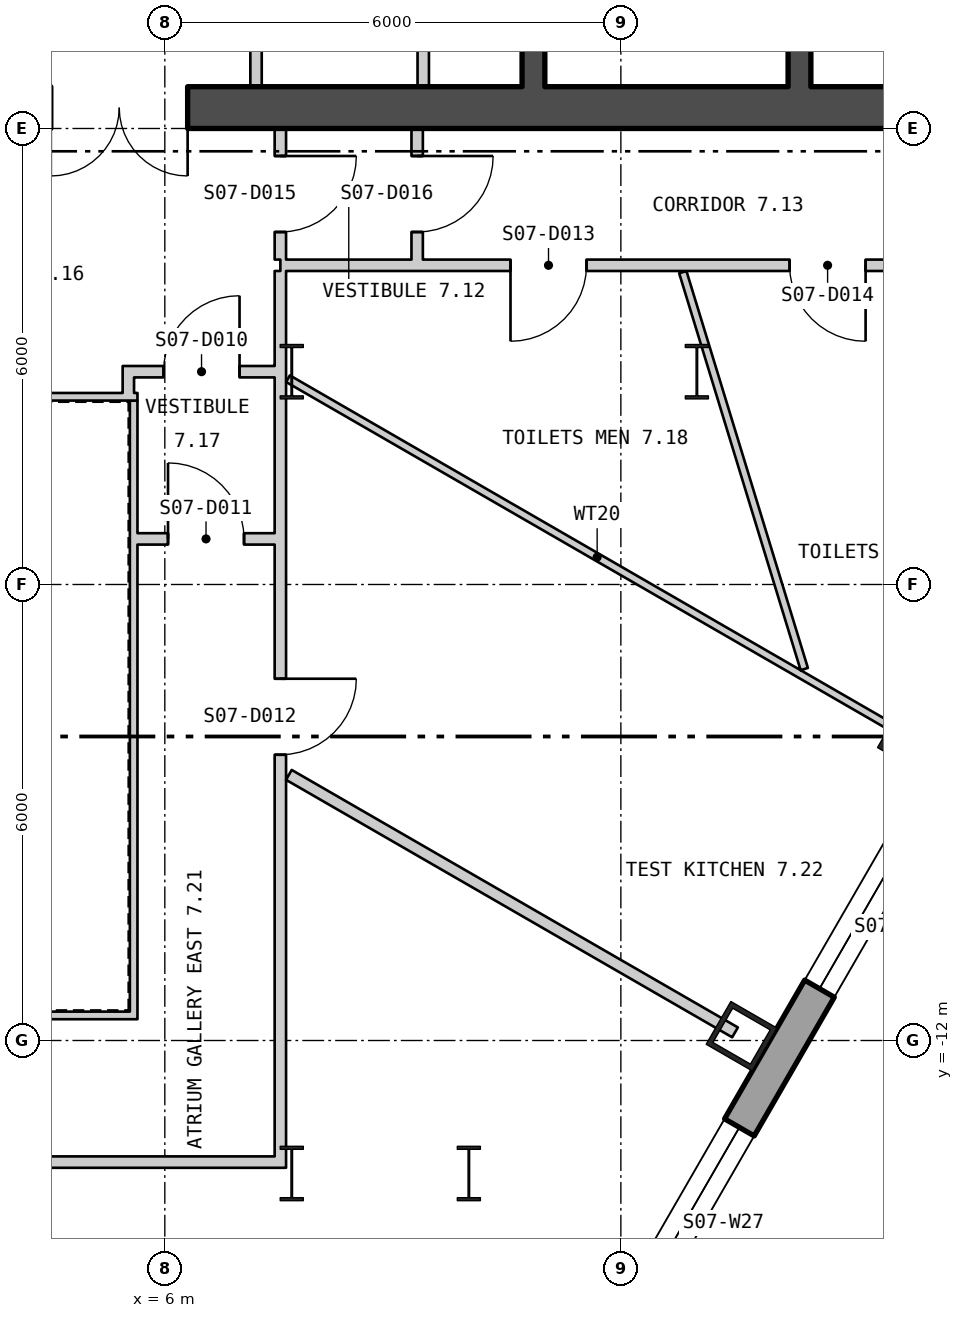
"""IFC4 building model, lengths in metres.
Left out: names, types, materials, properties, quantities, classifications, styles, units other than length and angle.
Written with IfcOpenShell. Run it as: python <this file> out.ifc"""

import sys

from ifc_helpers import new_model, si_unit, direction, frame, frame_2d, origin, origin_2d, place, context, subcontext, project, spatial, polyline, rectangle, hollow_rectangle, i_section, outline, extrude, element, fill, save


model = new_model("IFC4")
c1 = context("Model", 3, precision=1e-05, world=origin(), true_north=direction((0.0, 1.0)))
c2 = subcontext(c1, "Body", "Model", "MODEL_VIEW")
j1 = project(units=[si_unit("LENGTHUNIT", "METRE"), si_unit("PLANEANGLEUNIT", "RADIAN")], contexts=[c1])
p1 = place(None, origin())
s1 = spatial("IfcSite", under=j1, at=p1, CompositionType="ELEMENT")
p2 = place(p1, origin())
s2 = spatial("IfcBuilding", under=s1, at=p2, CompositionType="ELEMENT")
p3 = place(p2, frame((0.0, 0.0, 97.8)))
s3 = spatial("IfcBuildingStorey", under=s2, at=p3, CompositionType="ELEMENT", Elevation=97.8)
for number, where, z_axis, x_axis in (
    (1, (13.588, -11.943, 0.0), (0.0, 0.0, 1.0), (0.5, 0.866, 0.0)),
    (2, (15.842, -8.039, 0.0), (0.0, 0.0, 1.0), (0.5, 0.866, 0.0)),
):
    element("IfcColumn", number, at=place(p3, frame(where, z_axis=z_axis, x_axis=x_axis)), inside=s3, PredefinedType="COLUMN", context=c2, shape_type="SweptSolid", body=[
        extrude(hollow_rectangle(XDim=0.65, YDim=0.7, WallThickness=0.065, at=origin_2d()), origin(), (0.0, 0.0, 1.0), 4.5),
    ])
for number, where, z_axis, x_axis in (
    (3, (7.67, -3.2, 0.0), (0.0, 0.0, 1.0), (1.0, 0.0, 0.0)),
    (4, (7.67, -13.75, 0.0), (0.0, 0.0, 1.0), (1.0, 0.0, 0.0)),
    (5, (13.0, -3.2, 0.0), (0.0, 0.0, 1.0), (1.0, 0.0, 0.0)),
    (6, (10.0, -13.75, 0.0), (0.0, 0.0, 1.0), (1.0, 0.0, 0.0)),
):
    element("IfcColumn", number, at=place(p3, frame(where, z_axis=z_axis, x_axis=x_axis)), inside=s3, PredefinedType="COLUMN", context=c2, shape_type="SweptSolid", body=[
        extrude(i_section(OverallWidth=0.304, OverallDepth=0.716, WebThickness=0.021, FlangeThickness=0.04, at=origin_2d()), origin(), (0.0, 0.0, 1.0), 4.5),
    ])
p4 = place(p3, frame((4.905, -28.133, -0.18), z_axis=(0.0, 0.0, 1.0), x_axis=(0.500000711659, 0.866024992908, 0.0)))
e7 = element("IfcWall", 7, at=p4, inside=s3, PredefinedType="SOLIDWALL", context=c2, shape_type="SweptSolid", body=[
    extrude(outline(polyline([(-0.13, -0.225), (45.87, -0.225), (45.61, 0.225), (0.13, 0.225), (-0.13, -0.225)])), origin(), (0.0, 0.0, 1.0), 4.28),
])
p5 = place(p4, frame((1.424, 0.0, 1.08)))
e8 = element("IfcOpeningElement", 8, at=p5, cuts=e7, PredefinedType="OPENING", context=c2, shape_type="SweptSolid", body=[
    extrude(rectangle(XDim=2.4, YDim=2.6, at=frame_2d((1.2, 1.3))), frame((0.0, 0.235, 0.0), z_axis=(0.0, -1.0, 0.0), x_axis=(1.0, 0.0, 0.0)), (0.0, 0.0, 1.0), 0.47),
])
p6 = place(p4, frame((5.893, 0.0, 1.08)))
e9 = element("IfcOpeningElement", 9, at=p6, cuts=e7, PredefinedType="OPENING", context=c2, shape_type="SweptSolid", body=[
    extrude(rectangle(XDim=2.4, YDim=2.6, at=frame_2d((1.2, 1.3))), frame((0.0, 0.235, 0.0), z_axis=(0.0, -1.0, 0.0), x_axis=(1.0, 0.0, 0.0)), (0.0, 0.0, 1.0), 0.47),
])
p7 = place(p4, frame((10.401, 0.0, 1.08)))
e10 = element("IfcOpeningElement", 10, at=p7, cuts=e7, PredefinedType="OPENING", context=c2, shape_type="SweptSolid", body=[
    extrude(rectangle(XDim=2.4, YDim=2.6, at=frame_2d((1.2, 1.3))), frame((0.0, 0.235, 0.0), z_axis=(0.0, -1.0, 0.0), x_axis=(1.0, 0.0, 0.0)), (0.0, 0.0, 1.0), 0.47),
])
p8 = place(p4, frame((14.909, 0.0, 1.08)))
e11 = element("IfcOpeningElement", 11, at=p8, cuts=e7, PredefinedType="OPENING", context=c2, shape_type="SweptSolid", body=[
    extrude(rectangle(XDim=2.4, YDim=2.6, at=frame_2d((1.2, 1.3))), frame((0.0, 0.235, 0.0), z_axis=(0.0, -1.0, 0.0), x_axis=(1.0, 0.0, 0.0)), (0.0, 0.0, 1.0), 0.47),
])
p9 = place(p4, frame((19.416, 0.0, 1.08)))
e12 = element("IfcOpeningElement", 12, at=p9, cuts=e7, PredefinedType="OPENING", context=c2, shape_type="SweptSolid", body=[
    extrude(rectangle(XDim=2.4, YDim=2.6, at=frame_2d((1.2, 1.3))), frame((0.0, 0.235, 0.0), z_axis=(0.0, -1.0, 0.0), x_axis=(1.0, 0.0, 0.0)), (0.0, 0.0, 1.0), 0.47),
])
p10 = place(p4, frame((28.431, 0.0, 1.08)))
e13 = element("IfcOpeningElement", 13, at=p10, cuts=e7, PredefinedType="OPENING", context=c2, shape_type="SweptSolid", body=[
    extrude(rectangle(XDim=2.4, YDim=2.6, at=frame_2d((1.2, 1.3))), frame((0.0, 0.235, 0.0), z_axis=(0.0, -1.0, 0.0), x_axis=(1.0, 0.0, 0.0)), (0.0, 0.0, 1.0), 0.47),
])
p11 = place(p4, frame((32.939, 0.0, 1.08)))
e14 = element("IfcOpeningElement", 14, at=p11, cuts=e7, PredefinedType="OPENING", context=c2, shape_type="SweptSolid", body=[
    extrude(rectangle(XDim=2.4, YDim=2.6, at=frame_2d((1.2, 1.3))), frame((0.0, 0.235, 0.0), z_axis=(0.0, -1.0, 0.0), x_axis=(1.0, 0.0, 0.0)), (0.0, 0.0, 1.0), 0.47),
])
p12 = place(p4, frame((37.447, 0.0, 1.08)))
e15 = element("IfcOpeningElement", 15, at=p12, cuts=e7, PredefinedType="OPENING", context=c2, shape_type="SweptSolid", body=[
    extrude(rectangle(XDim=2.4, YDim=2.6, at=frame_2d((1.2, 1.3))), frame((0.0, 0.235, 0.0), z_axis=(0.0, -1.0, 0.0), x_axis=(1.0, 0.0, 0.0)), (0.0, 0.0, 1.0), 0.47),
])
p13 = place(p4, frame((41.916, 0.0, 1.08)))
e16 = element("IfcOpeningElement", 16, at=p13, cuts=e7, PredefinedType="OPENING", context=c2, shape_type="SweptSolid", body=[
    extrude(rectangle(XDim=2.4, YDim=2.6, at=frame_2d((1.2, 1.3))), frame((0.0, 0.235, 0.0), z_axis=(0.0, -1.0, 0.0), x_axis=(1.0, 0.0, 0.0)), (0.0, 0.0, 1.0), 0.47),
])
p14 = place(p3, frame((-5.64, -11.67, 0.0), z_axis=(0.0, 0.0, 1.0), x_axis=(1.0, 0.0, 0.0)))
e17 = element("IfcWall", 17, at=p14, inside=s3, PredefinedType="PARTITIONING", context=c2, shape_type="SweptSolid", body=[
    extrude(rectangle(XDim=11.28, YDim=0.1, at=frame_2d((5.64, 0.0))), origin(), (0.0, 0.0, 1.0), 4.3),
])
p15 = place(p3, frame((5.59, -11.62, 0.0), z_axis=(0.0, 0.0, 1.0), x_axis=(0.0, 1.0, 0.0)))
e18 = element("IfcWall", 18, at=p15, inside=s3, PredefinedType="PARTITIONING", context=c2, shape_type="SweptSolid", body=[
    extrude(rectangle(XDim=8.04, YDim=0.1, at=frame_2d((4.02, 0.0))), origin(), (0.0, 0.0, 1.0), 4.3),
])
p16 = place(p3, frame((5.64, -3.53, 0.0), z_axis=(0.0, 0.0, 1.0), x_axis=(-1.0, 0.0, 0.0)))
e19 = element("IfcWall", 19, at=p16, inside=s3, PredefinedType="PARTITIONING", context=c2, shape_type="SweptSolid", body=[
    extrude(rectangle(XDim=11.28, YDim=0.1, at=frame_2d((5.64, 0.0))), origin(), (0.0, 0.0, 1.0), 4.3),
])
p17 = place(p3, frame((-17.5, 0.275, 0.0), z_axis=(0.0, 0.0, 1.0), x_axis=(1.0, 0.0, 0.0)))
e20 = element("IfcWall", 20, at=p17, inside=s3, PredefinedType="SHEAR", context=c2, shape_type="SweptSolid", body=[
    extrude(rectangle(XDim=35.0, YDim=0.55, at=frame_2d((17.5, 0.0))), origin(), (0.0, 0.0, 1.0), 4.3),
])
p18 = place(p17, frame((12.0, 0.0, 0.0)))
e21 = element("IfcOpeningElement", 21, at=p18, cuts=e20, PredefinedType="OPENING", context=c2, shape_type="SweptSolid", body=[
    extrude(rectangle(XDim=1.8, YDim=2.4, at=frame_2d((0.9, 1.2))), frame((0.0, 0.285, 0.0), z_axis=(0.0, -1.0, 0.0), x_axis=(1.0, 0.0, 0.0)), (0.0, 0.0, 1.0), 0.57),
])
p19 = place(p17, frame((22.0, 0.0, 0.0)))
e22 = element("IfcOpeningElement", 22, at=p19, cuts=e20, PredefinedType="OPENING", context=c2, shape_type="SweptSolid", body=[
    extrude(rectangle(XDim=1.8, YDim=2.4, at=frame_2d((0.9, 1.2))), frame((0.0, 0.285, 0.0), z_axis=(0.0, -1.0, 0.0), x_axis=(1.0, 0.0, 0.0)), (0.0, 0.0, 1.0), 0.57),
])
p20 = place(p3, frame((10.85, 0.55, 0.0), z_axis=(0.0, 0.0, 1.0), x_axis=(0.0, 1.0, 0.0)))
e23 = element("IfcWall", 23, at=p20, inside=s3, PredefinedType="SHEAR", context=c2, shape_type="SweptSolid", body=[
    extrude(rectangle(XDim=16.9, YDim=0.3, at=frame_2d((8.45, 0.0))), origin(), (0.0, 0.0, 1.0), 4.3),
])
p21 = place(p20, frame((5.125, 0.0, 0.0)))
e24 = element("IfcOpeningElement", 24, at=p21, cuts=e23, PredefinedType="OPENING", context=c2, shape_type="SweptSolid", body=[
    extrude(rectangle(XDim=1.25, YDim=2.1, at=frame_2d((0.625, 1.05))), frame((0.0, 0.16, 0.0), z_axis=(0.0, -1.0, 0.0), x_axis=(1.0, 0.0, 0.0)), (0.0, 0.0, 1.0), 0.32),
])
p22 = place(p20, frame((1.55, 0.0, 0.0)))
e25 = element("IfcOpeningElement", 25, at=p22, cuts=e23, PredefinedType="OPENING", context=c2, shape_type="SweptSolid", body=[
    extrude(rectangle(XDim=1.0, YDim=2.1, at=frame_2d((0.5, 1.05))), frame((0.0, 0.16, 0.0), z_axis=(0.0, -1.0, 0.0), x_axis=(1.0, 0.0, 0.0)), (0.0, 0.0, 1.0), 0.32),
])
p23 = place(p3, frame((14.35, 0.55, 0.0), z_axis=(0.0, 0.0, 1.0), x_axis=(0.0, 1.0, 0.0)))
e26 = element("IfcWall", 26, at=p23, inside=s3, PredefinedType="SHEAR", context=c2, shape_type="SweptSolid", body=[
    extrude(rectangle(XDim=16.9, YDim=0.3, at=frame_2d((8.45, 0.0))), origin(), (0.0, 0.0, 1.0), 4.3),
])
p24 = place(p23, frame((5.75, 0.0, 0.0)))
e27 = element("IfcOpeningElement", 27, at=p24, cuts=e26, PredefinedType="OPENING", context=c2, shape_type="SweptSolid", body=[
    extrude(rectangle(XDim=1.5, YDim=2.1, at=frame_2d((0.75, 1.05))), frame((0.0, 0.16, 0.0), z_axis=(0.0, -1.0, 0.0), x_axis=(1.0, 0.0, 0.0)), (0.0, 0.0, 1.0), 0.32),
])
for number, where, z_axis, x_axis in (
    (28, (7.2, 0.55, 0.0), (0.0, 0.0, 1.0), (0.0, 1.0, 0.0)),
    (29, (9.4, 0.55, 0.0), (0.0, 0.0, 1.0), (0.0, 1.0, 0.0)),
):
    element("IfcWall", number, at=place(p3, frame(where, z_axis=z_axis, x_axis=x_axis)), inside=s3, PredefinedType="PARTITIONING", context=c2, shape_type="SweptSolid", body=[
        extrude(rectangle(XDim=3.075, YDim=0.15, at=frame_2d((1.538, 0.0))), origin(), (0.0, 0.0, 1.0), 4.3),
    ])
p25 = place(p3, frame((4.3, -13.6, 0.0), z_axis=(0.0, 0.0, 1.0), x_axis=(1.0, 0.0, 0.0)))
e30 = element("IfcWall", 30, at=p25, inside=s3, PredefinedType="PARTITIONING", context=c2, shape_type="SweptSolid", body=[
    extrude(rectangle(XDim=3.145, YDim=0.15, at=frame_2d((1.573, 0.0))), origin(), (0.0, 0.0, 1.0), 3.39),
])
p26 = place(p3, frame((5.445, -3.2, 0.0), z_axis=(0.0, 0.0, 1.0), x_axis=(1.0, 0.0, 0.0)))
e31 = element("IfcWall", 31, at=p26, inside=s3, PredefinedType="PARTITIONING", context=c2, shape_type="SweptSolid", body=[
    extrude(rectangle(XDim=2.0, YDim=0.15, at=frame_2d((1.0, 0.0))), origin(), (0.0, 0.0, 1.0), 3.39),
])
p27 = place(p26, frame((0.538, 0.0, 0.0)))
e32 = element("IfcOpeningElement", 32, at=p27, cuts=e31, PredefinedType="OPENING", context=c2, shape_type="SweptSolid", body=[
    extrude(rectangle(XDim=1.0, YDim=2.1, at=frame_2d((0.5, 1.05))), frame((0.0, 0.085, 0.0), z_axis=(0.0, -1.0, 0.0), x_axis=(1.0, 0.0, 0.0)), (0.0, 0.0, 1.0), 0.17),
])
p28 = place(p3, frame((5.52, -3.48, 0.0), z_axis=(0.0, 0.0, 1.0), x_axis=(0.0, 1.0, 0.0)))
e33 = element("IfcWall", 33, at=p28, inside=s3, PredefinedType="PARTITIONING", context=c2, shape_type="SweptSolid", body=[
    extrude(rectangle(XDim=0.205, YDim=0.15, at=frame_2d((0.102, 0.0))), origin(), (0.0, 0.0, 1.0), 4.3),
])
p29 = place(p3, frame((5.64, -5.4, 0.0), z_axis=(0.0, 0.0, 1.0), x_axis=(1.0, 0.0, 0.0)))
e34 = element("IfcWall", 34, at=p29, inside=s3, PredefinedType="PARTITIONING", context=c2, shape_type="SweptSolid", body=[
    extrude(rectangle(XDim=1.805, YDim=0.15, at=frame_2d((0.902, 0.0))), origin(), (0.0, 0.0, 1.0), 4.3),
])
p30 = place(p29, frame((0.402, 0.0, 0.0)))
e35 = element("IfcOpeningElement", 35, at=p30, cuts=e34, PredefinedType="OPENING", context=c2, shape_type="SweptSolid", body=[
    extrude(rectangle(XDim=1.0, YDim=2.1, at=frame_2d((0.5, 1.05))), frame((0.0, 0.085, 0.0), z_axis=(0.0, -1.0, 0.0), x_axis=(1.0, 0.0, 0.0)), (0.0, 0.0, 1.0), 0.17),
])
p31 = place(p3, frame((7.52, -13.675, 0.0), z_axis=(0.0, 0.0, 1.0), x_axis=(0.0, 1.0, 0.0)))
e36 = element("IfcWall", 36, at=p31, inside=s3, PredefinedType="PARTITIONING", context=c2, shape_type="SweptSolid", body=[
    extrude(rectangle(XDim=10.452, YDim=0.15, at=frame_2d((5.226, 0.0))), origin(), (0.0, 0.0, 1.0), 3.7),
])
p32 = place(p31, frame((5.435, 0.0, 0.0)))
e37 = element("IfcOpeningElement", 37, at=p32, cuts=e36, PredefinedType="OPENING", context=c2, shape_type="SweptSolid", body=[
    extrude(rectangle(XDim=1.0, YDim=2.1, at=frame_2d((0.5, 1.05))), frame((0.0, 0.085, 0.0), z_axis=(0.0, -1.0, 0.0), x_axis=(1.0, 0.0, 0.0)), (0.0, 0.0, 1.0), 0.17),
])
p33 = place(p3, frame((7.52, -3.223, 0.0), z_axis=(0.0, 0.0, 1.0), x_axis=(0.0, 1.0, 0.0)))
e38 = element("IfcWall", 38, at=p33, inside=s3, PredefinedType="PARTITIONING", context=c2, shape_type="SweptSolid", body=[
    extrude(rectangle(XDim=1.348, YDim=0.15, at=frame_2d((0.674, 0.0))), origin(), (0.0, 0.0, 1.0), 4.3),
])
p34 = place(p3, frame((7.52, -1.8, 0.0), z_axis=(0.0, 0.0, 1.0), x_axis=(1.0, 0.0, 0.0)))
e39 = element("IfcWall", 39, at=p34, inside=s3, PredefinedType="PARTITIONING", context=c2, shape_type="SweptSolid", body=[
    extrude(rectangle(XDim=11.705, YDim=0.15, at=frame_2d((5.853, 0.0))), origin(), (0.0, 0.0, 1.0), 4.3),
])
p35 = place(p34, frame((3.028, 0.0, 0.0)))
e40 = element("IfcOpeningElement", 40, at=p35, cuts=e39, PredefinedType="OPENING", context=c2, shape_type="SweptSolid", body=[
    extrude(rectangle(XDim=1.0, YDim=2.1, at=frame_2d((0.5, 1.05))), frame((0.0, 0.085, 0.0), z_axis=(0.0, -1.0, 0.0), x_axis=(1.0, 0.0, 0.0)), (0.0, 0.0, 1.0), 0.17),
])
p36 = place(p34, frame((6.7, 0.0, 0.0)))
e41 = element("IfcOpeningElement", 41, at=p36, cuts=e39, PredefinedType="OPENING", context=c2, shape_type="SweptSolid", body=[
    extrude(rectangle(XDim=1.0, YDim=2.1, at=frame_2d((0.5, 1.05))), frame((0.0, 0.085, 0.0), z_axis=(0.0, -1.0, 0.0), x_axis=(1.0, 0.0, 0.0)), (0.0, 0.0, 1.0), 0.17),
])
p37 = place(p3, frame((7.52, -1.725, 0.0), z_axis=(0.0, 0.0, 1.0), x_axis=(0.0, 1.0, 0.0)))
e42 = element("IfcWall", 42, at=p37, inside=s3, PredefinedType="PARTITIONING", context=c2, shape_type="SweptSolid", body=[
    extrude(rectangle(XDim=1.725, YDim=0.15, at=frame_2d((0.863, 0.0))), origin(), (0.0, 0.0, 1.0), 4.3),
])
p38 = place(p37, frame((0.363, 0.0, 0.0)))
e43 = element("IfcOpeningElement", 43, at=p38, cuts=e42, PredefinedType="OPENING", context=c2, shape_type="SweptSolid", body=[
    extrude(rectangle(XDim=1.0, YDim=2.1, at=frame_2d((0.5, 1.05))), frame((0.0, 0.085, 0.0), z_axis=(0.0, -1.0, 0.0), x_axis=(1.0, 0.0, 0.0)), (0.0, 0.0, 1.0), 0.17),
])
p39 = place(p3, frame((7.62, -3.292, 0.0), z_axis=(0.0, 0.0, 1.0), x_axis=(0.866086324858, -0.499894466757, 0.0)))
e44 = element("IfcWall", 44, at=p39, inside=s3, PredefinedType="PARTITIONING", context=c2, shape_type="SweptSolid", body=[
    extrude(rectangle(XDim=9.394, YDim=0.1, at=frame_2d((4.697, 0.0))), origin(), (0.0, 0.0, 1.0), 4.3),
])
p40 = place(p3, frame((7.632, -8.505, 0.0), z_axis=(0.0, 0.0, 1.0), x_axis=(0.866092229152, -0.499884237201, 0.0)))
e45 = element("IfcWall", 45, at=p40, inside=s3, PredefinedType="PARTITIONING", context=c2, shape_type="SweptSolid", body=[
    extrude(rectangle(XDim=6.778, YDim=0.15, at=frame_2d((3.389, 0.0))), origin(), (0.0, 0.0, 1.0), 4.3),
])
p41 = place(p3, frame((9.32, -1.725, 0.0), z_axis=(0.0, 0.0, 1.0), x_axis=(0.0, 1.0, 0.0)))
e46 = element("IfcWall", 46, at=p41, inside=s3, PredefinedType="PARTITIONING", context=c2, shape_type="SweptSolid", body=[
    extrude(rectangle(XDim=1.725, YDim=0.15, at=frame_2d((0.863, 0.0))), origin(), (0.0, 0.0, 1.0), 4.3),
])
p42 = place(p41, frame((0.363, 0.0, 0.0)))
e47 = element("IfcOpeningElement", 47, at=p42, cuts=e46, PredefinedType="OPENING", context=c2, shape_type="SweptSolid", body=[
    extrude(rectangle(XDim=1.0, YDim=2.1, at=frame_2d((0.5, 1.05))), frame((0.0, 0.085, 0.0), z_axis=(0.0, -1.0, 0.0), x_axis=(1.0, 0.0, 0.0)), (0.0, 0.0, 1.0), 0.17),
])
p43 = place(p3, frame((12.815, -1.89, 0.0), z_axis=(0.0, 0.0, 1.0), x_axis=(0.292567369611, -0.956244913314, 0.0)))
e48 = element("IfcWall", 48, at=p43, inside=s3, PredefinedType="PARTITIONING", context=c2, shape_type="SweptSolid", body=[
    extrude(rectangle(XDim=5.462, YDim=0.1, at=frame_2d((2.731, 0.0))), origin(), (0.0, 0.0, 1.0), 4.3),
])
p44 = place(p8, origin())
e49 = element("IfcWindow", 49, at=p44, inside=s3, PartitioningType="SINGLE_PANEL", PredefinedType="WINDOW", context=c2, shape_type="SweptSolid", body=[
    extrude(rectangle(XDim=2.4, YDim=2.6, at=frame_2d((1.2, 1.3))), frame((0.0, 0.105, 0.0), z_axis=(0.0, -1.0, 0.0), x_axis=(1.0, 0.0, 0.0)), (0.0, 0.0, 1.0), 0.06),
])
fill(e11, e49)
p45 = place(p9, origin())
e50 = element("IfcWindow", 50, at=p45, inside=s3, PartitioningType="SINGLE_PANEL", PredefinedType="WINDOW", context=c2, shape_type="SweptSolid", body=[
    extrude(rectangle(XDim=2.4, YDim=2.6, at=frame_2d((1.2, 1.3))), frame((0.0, 0.105, 0.0), z_axis=(0.0, -1.0, 0.0), x_axis=(1.0, 0.0, 0.0)), (0.0, 0.0, 1.0), 0.06),
])
fill(e12, e50)
p46 = place(p19, origin())
e51 = element("IfcDoor", 51, at=p46, inside=s3, OperationType="DOUBLE_DOOR_SINGLE_SWING", PredefinedType="DOOR", context=c2, shape_type="SweptSolid", body=[
    extrude(rectangle(XDim=1.8, YDim=2.4, at=frame_2d((0.9, 1.2))), frame((0.0, 0.025, 0.0), z_axis=(0.0, -1.0, 0.0), x_axis=(1.0, 0.0, 0.0)), (0.0, 0.0, 1.0), 0.05),
])
fill(e22, e51)
p47 = place(p27, origin())
e52 = element("IfcDoor", 52, at=p47, inside=s3, OperationType="SINGLE_SWING_LEFT", PredefinedType="DOOR", context=c2, shape_type="SweptSolid", body=[
    extrude(rectangle(XDim=1.0, YDim=2.1, at=frame_2d((0.5, 1.05))), frame((0.0, 0.025, 0.0), z_axis=(0.0, -1.0, 0.0), x_axis=(1.0, 0.0, 0.0)), (0.0, 0.0, 1.0), 0.05),
])
fill(e32, e52)
p48 = place(p30, origin())
e53 = element("IfcDoor", 53, at=p48, inside=s3, OperationType="SINGLE_SWING_RIGHT", PredefinedType="DOOR", context=c2, shape_type="SweptSolid", body=[
    extrude(rectangle(XDim=1.0, YDim=2.1, at=frame_2d((0.5, 1.05))), frame((0.0, 0.025, 0.0), z_axis=(0.0, -1.0, 0.0), x_axis=(1.0, 0.0, 0.0)), (0.0, 0.0, 1.0), 0.05),
])
fill(e35, e53)
p49 = place(p32, origin())
e54 = element("IfcDoor", 54, at=p49, inside=s3, OperationType="SINGLE_SWING_RIGHT", PredefinedType="DOOR", context=c2, shape_type="SweptSolid", body=[
    extrude(rectangle(XDim=1.0, YDim=2.1, at=frame_2d((0.5, 1.05))), frame((0.0, 0.025, 0.0), z_axis=(0.0, -1.0, 0.0), x_axis=(1.0, 0.0, 0.0)), (0.0, 0.0, 1.0), 0.05),
])
fill(e37, e54)
p50 = place(p35, origin())
e55 = element("IfcDoor", 55, at=p50, inside=s3, OperationType="SINGLE_SWING_LEFT", PredefinedType="DOOR", context=c2, shape_type="SweptSolid", body=[
    extrude(rectangle(XDim=1.0, YDim=2.1, at=frame_2d((0.5, 1.05))), frame((0.0, 0.025, 0.0), z_axis=(0.0, -1.0, 0.0), x_axis=(1.0, 0.0, 0.0)), (0.0, 0.0, 1.0), 0.05),
])
fill(e40, e55)
p51 = place(p36, origin())
e56 = element("IfcDoor", 56, at=p51, inside=s3, OperationType="SINGLE_SWING_RIGHT", PredefinedType="DOOR", context=c2, shape_type="SweptSolid", body=[
    extrude(rectangle(XDim=1.0, YDim=2.1, at=frame_2d((0.5, 1.05))), frame((0.0, 0.025, 0.0), z_axis=(0.0, -1.0, 0.0), x_axis=(1.0, 0.0, 0.0)), (0.0, 0.0, 1.0), 0.05),
])
fill(e41, e56)
p52 = place(p38, origin())
e57 = element("IfcDoor", 57, at=p52, inside=s3, OperationType="SINGLE_SWING_RIGHT", PredefinedType="DOOR", context=c2, shape_type="SweptSolid", body=[
    extrude(rectangle(XDim=1.0, YDim=2.1, at=frame_2d((0.5, 1.05))), frame((0.0, 0.025, 0.0), z_axis=(0.0, -1.0, 0.0), x_axis=(1.0, 0.0, 0.0)), (0.0, 0.0, 1.0), 0.05),
])
fill(e43, e57)
p53 = place(p42, origin())
e58 = element("IfcDoor", 58, at=p53, inside=s3, OperationType="SINGLE_SWING_RIGHT", PredefinedType="DOOR", context=c2, shape_type="SweptSolid", body=[
    extrude(rectangle(XDim=1.0, YDim=2.1, at=frame_2d((0.5, 1.05))), frame((0.0, 0.025, 0.0), z_axis=(0.0, -1.0, 0.0), x_axis=(1.0, 0.0, 0.0)), (0.0, 0.0, 1.0), 0.05),
])
fill(e47, e58)
save(model, sys.argv[1])
